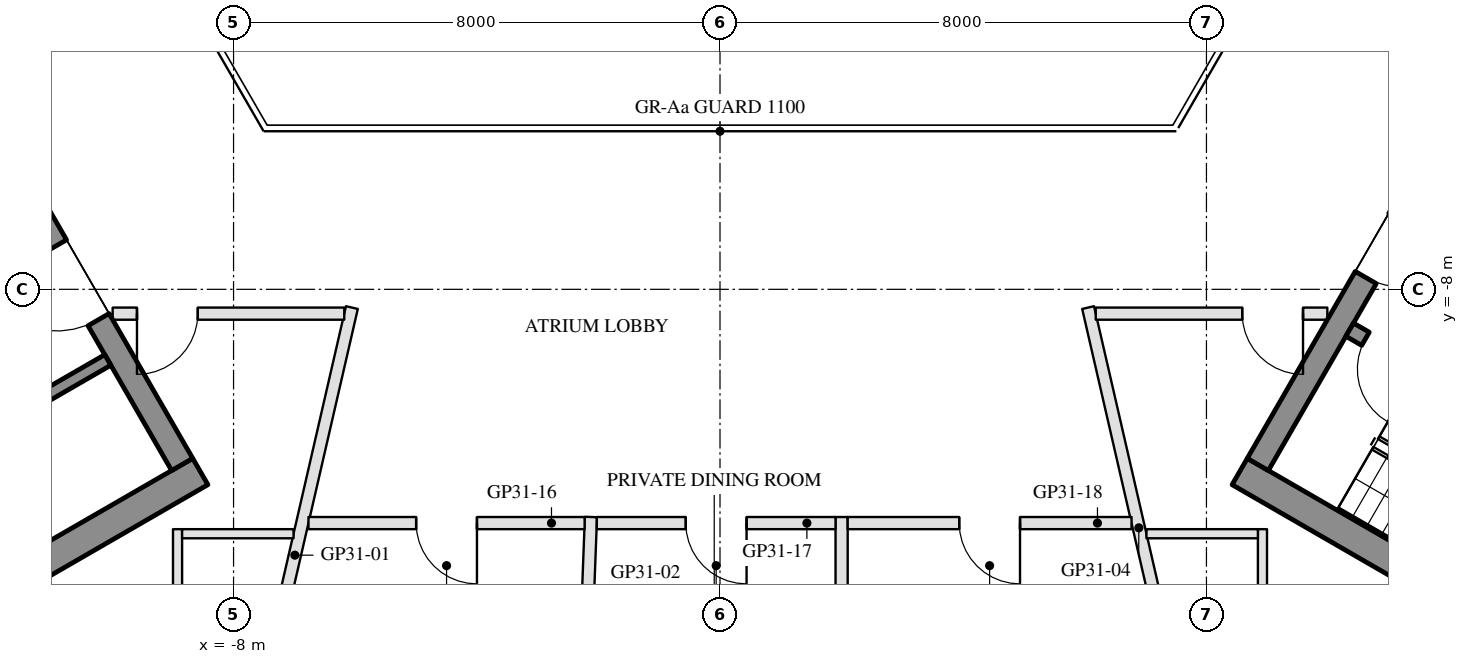
"""IFC4 building model, lengths in metres.
Left out: names, types, materials, properties, quantities, classifications, styles, units other than length and angle.
Written with IfcOpenShell. Run it as: python <this file> out.ifc"""

import sys

from ifc_helpers import new_model, si_unit, direction, frame, frame_2d, origin, place, context, subcontext, project, spatial, rectangle, extrude, element, fill, save


model = new_model("IFC4")
c1 = context("Model", 3, precision=1e-05, world=origin(), true_north=direction((0.0, 1.0)))
c2 = subcontext(c1, "Body", "Model", "MODEL_VIEW")
j1 = project(units=[si_unit("LENGTHUNIT", "METRE"), si_unit("PLANEANGLEUNIT", "RADIAN")], contexts=[c1])
p1 = place(None, origin())
s1 = spatial("IfcSite", under=j1, at=p1, CompositionType="ELEMENT")
p2 = place(p1, origin())
s2 = spatial("IfcBuilding", under=s1, at=p2, CompositionType="ELEMENT")
p3 = place(p2, frame((0.0, 0.0, 305.9)))
s3 = spatial("IfcBuildingStorey", under=s2, at=p3, CompositionType="ELEMENT", Elevation=305.9)
p4 = place(p3, frame((-8.547, -10.997, 0.0), z_axis=(0.0, 0.0, 1.0), x_axis=(-0.866027279078, -0.499996751883, 0.0)))
e1 = element("IfcWall", 1, at=p4, inside=s3, PredefinedType="SHEAR", context=c2, shape_type="SweptSolid", body=[
    extrude(rectangle(XDim=10.298, YDim=0.5, at=frame_2d((5.149, 0.0))), origin(), (0.0, 0.0, 1.0), 3.5),
])
p5 = place(p3, frame((-13.845, -2.22, 0.0), z_axis=(0.0, 0.0, 1.0), x_axis=(0.500004234368, -0.866022959057, 0.0)))
e2 = element("IfcWall", 2, at=p5, inside=s3, PredefinedType="SHEAR", context=c2, shape_type="SweptSolid", body=[
    extrude(rectangle(XDim=10.0, YDim=0.4, at=frame_2d((5.0, 0.0))), origin(), (0.0, 0.0, 1.0), 3.5),
])
p6 = place(p5, frame((3.55, 0.0, 0.0)))
e3 = element("IfcOpeningElement", 3, at=p6, cuts=e2, PredefinedType="OPENING", context=c2, shape_type="SweptSolid", body=[
    extrude(rectangle(XDim=1.1, YDim=2.1, at=frame_2d((0.55, 1.05))), frame((0.0, 0.21, 0.0), z_axis=(0.0, -1.0, 0.0), x_axis=(1.0, 0.0, 0.0)), (0.0, 0.0, 1.0), 0.42),
])
p7 = place(p5, frame((5.85, 0.0, 0.0)))
e4 = element("IfcOpeningElement", 4, at=p7, cuts=e2, PredefinedType="OPENING", context=c2, shape_type="SweptSolid", body=[
    extrude(rectangle(XDim=1.4, YDim=2.1, at=frame_2d((0.7, 1.05))), frame((0.0, 0.21, 0.0), z_axis=(0.0, -1.0, 0.0), x_axis=(1.0, 0.0, 0.0)), (0.0, 0.0, 1.0), 0.42),
])
p8 = place(p3, frame((-10.068, -9.162, 0.0), z_axis=(0.0, 0.0, 1.0), x_axis=(-0.866032725843, -0.499987317609, 0.0)))
e5 = element("IfcWall", 5, at=p8, inside=s3, PredefinedType="SHEAR", context=c2, shape_type="SweptSolid", body=[
    extrude(rectangle(XDim=10.16, YDim=0.2, at=frame_2d((5.08, 0.0))), origin(), (0.0, 0.0, 1.0), 3.5),
])
p9 = place(p8, frame((4.53, 0.0, 0.0)))
e6 = element("IfcOpeningElement", 6, at=p9, cuts=e5, PredefinedType="OPENING", context=c2, shape_type="SweptSolid", body=[
    extrude(rectangle(XDim=0.9, YDim=2.1, at=frame_2d((0.45, 1.05))), frame((0.0, 0.11, 0.0), z_axis=(0.0, -1.0, 0.0), x_axis=(1.0, 0.0, 0.0)), (0.0, 0.0, 1.0), 0.22),
])
p10 = place(p3, frame((8.547, -10.997, 0.0), z_axis=(0.0, 0.0, 1.0), x_axis=(0.866027279078, -0.499996751883, 0.0)))
e7 = element("IfcWall", 7, at=p10, inside=s3, PredefinedType="SHEAR", context=c2, shape_type="SweptSolid", body=[
    extrude(rectangle(XDim=10.298, YDim=0.5, at=frame_2d((5.149, 0.0))), origin(), (0.0, 0.0, 1.0), 3.5),
])
p11 = place(p3, frame((8.845, -10.88, 0.0), z_axis=(0.0, 0.0, 1.0), x_axis=(0.500004234368, 0.866022959057, 0.0)))
e8 = element("IfcWall", 8, at=p11, inside=s3, PredefinedType="SHEAR", context=c2, shape_type="SweptSolid", body=[
    extrude(rectangle(XDim=10.0, YDim=0.4, at=frame_2d((5.0, 0.0))), origin(), (0.0, 0.0, 1.0), 3.5),
])
p12 = place(p11, frame((3.55, 0.0, 0.0)))
e9 = element("IfcOpeningElement", 9, at=p12, cuts=e8, PredefinedType="OPENING", context=c2, shape_type="SweptSolid", body=[
    extrude(rectangle(XDim=1.1, YDim=2.1, at=frame_2d((0.55, 1.05))), frame((0.0, 0.21, 0.0), z_axis=(0.0, -1.0, 0.0), x_axis=(1.0, 0.0, 0.0)), (0.0, 0.0, 1.0), 0.42),
])
p13 = place(p11, frame((5.85, 0.0, 0.0)))
e10 = element("IfcOpeningElement", 10, at=p13, cuts=e8, PredefinedType="OPENING", context=c2, shape_type="SweptSolid", body=[
    extrude(rectangle(XDim=1.4, YDim=2.1, at=frame_2d((0.7, 1.05))), frame((0.0, 0.21, 0.0), z_axis=(0.0, -1.0, 0.0), x_axis=(1.0, 0.0, 0.0)), (0.0, 0.0, 1.0), 0.42),
])
p14 = place(p3, frame((10.356, -8.664, 0.0), z_axis=(0.0, 0.0, 1.0), x_axis=(0.866028629588, -0.499994412703, 0.0)))
e11 = element("IfcWall", 11, at=p14, inside=s3, PredefinedType="SHEAR", context=c2, shape_type="SweptSolid", body=[
    extrude(rectangle(XDim=6.45, YDim=0.25, at=frame_2d((3.225, 0.0))), origin(), (0.0, 0.0, 1.0), 3.5),
])
p15 = place(p14, frame((0.3, 0.0, 0.0)))
e12 = element("IfcOpeningElement", 12, at=p15, cuts=e11, PredefinedType="OPENING", context=c2, shape_type="SweptSolid", body=[
    extrude(rectangle(XDim=1.0, YDim=2.1, at=frame_2d((0.5, 1.05))), frame((0.0, 0.135, 0.0), z_axis=(0.0, -1.0, 0.0), x_axis=(1.0, 0.0, 0.0)), (0.0, 0.0, 1.0), 0.27),
])
p16 = place(p3, frame((-7.93, -16.445, 0.0), z_axis=(0.0, 0.0, 1.0), x_axis=(0.224458408835, 0.974483669798, 0.0)))
e13 = element("IfcWall", 13, at=p16, inside=s3, PredefinedType="PARTITIONING", context=c2, shape_type="SweptSolid", body=[
    extrude(rectangle(XDim=8.358, YDim=0.2, at=frame_2d((4.179, 0.0))), origin(), (0.0, 0.0, 1.0), 3.1),
])
p17 = place(p3, frame((-2.266, -15.545, 0.0), z_axis=(0.0, 0.0, 1.0), x_axis=(0.037750136795, 0.999287209551, 0.0)))
e14 = element("IfcWall", 14, at=p17, inside=s3, PredefinedType="PARTITIONING", context=c2, shape_type="SweptSolid", body=[
    extrude(rectangle(XDim=3.803, YDim=0.2, at=frame_2d((1.901, 0.0))), origin(), (0.0, 0.0, 1.0), 3.1),
])
p18 = place(p3, frame((2.0, -16.445, 0.0), z_axis=(0.0, 0.0, 1.0), x_axis=(0.0, 1.0, 0.0)))
e15 = element("IfcWall", 15, at=p18, inside=s3, PredefinedType="PARTITIONING", context=c2, shape_type="SweptSolid", body=[
    extrude(rectangle(XDim=4.7, YDim=0.2, at=frame_2d((2.35, 0.0))), origin(), (0.0, 0.0, 1.0), 3.1),
])
p19 = place(p3, frame((7.723, -15.545, 0.0), z_axis=(0.0, 0.0, 1.0), x_axis=(-0.224458954761, 0.974483544052, 0.0)))
e16 = element("IfcWall", 16, at=p19, inside=s3, PredefinedType="PARTITIONING", context=c2, shape_type="SweptSolid", body=[
    extrude(rectangle(XDim=7.434, YDim=0.2, at=frame_2d((3.717, 0.0))), origin(), (0.0, 0.0, 1.0), 3.1),
])
p20 = place(p3, frame((-6.18, -8.4, 0.0), z_axis=(0.0, 0.0, 1.0), x_axis=(-1.0, 0.0, 0.0)))
e17 = element("IfcWall", 17, at=p20, inside=s3, PredefinedType="PARTITIONING", context=c2, shape_type="SweptSolid", body=[
    extrude(rectangle(XDim=3.809, YDim=0.2, at=frame_2d((1.904, 0.0))), origin(), (0.0, 0.0, 1.0), 3.1),
])
p21 = place(p20, frame((2.409, 0.0, 0.0)))
e18 = element("IfcOpeningElement", 18, at=p21, cuts=e17, PredefinedType="OPENING", context=c2, shape_type="SweptSolid", body=[
    extrude(rectangle(XDim=1.0, YDim=2.1, at=frame_2d((0.5, 1.05))), frame((0.0, 0.11, 0.0), z_axis=(0.0, -1.0, 0.0), x_axis=(1.0, 0.0, 0.0)), (0.0, 0.0, 1.0), 0.22),
])
p22 = place(p3, frame((-8.921, -11.945, 0.0), z_axis=(0.0, 0.0, 1.0), x_axis=(0.0, -1.0, 0.0)))
e19 = element("IfcWall", 19, at=p22, inside=s3, PredefinedType="PARTITIONING", context=c2, shape_type="SweptSolid", body=[
    extrude(rectangle(XDim=2.8, YDim=0.15, at=frame_2d((1.4, 0.0))), origin(), (0.0, 0.0, 1.0), 3.1),
])
p23 = place(p22, frame((1.4, 0.0, 0.0)))
e20 = element("IfcOpeningElement", 20, at=p23, cuts=e19, PredefinedType="OPENING", context=c2, shape_type="SweptSolid", body=[
    extrude(rectangle(XDim=0.9, YDim=2.1, at=frame_2d((0.45, 1.05))), frame((0.0, 0.085, 0.0), z_axis=(0.0, -1.0, 0.0), x_axis=(1.0, 0.0, 0.0)), (0.0, 0.0, 1.0), 0.17),
])
p24 = place(p3, frame((-8.846, -12.02, 0.0), z_axis=(0.0, 0.0, 1.0), x_axis=(1.0, 0.0, 0.0)))
e21 = element("IfcWall", 21, at=p24, inside=s3, PredefinedType="PARTITIONING", context=c2, shape_type="SweptSolid", body=[
    extrude(rectangle(XDim=1.833, YDim=0.15, at=frame_2d((0.917, 0.0))), origin(), (0.0, 0.0, 1.0), 3.55),
])
p25 = place(p3, frame((-2.226, -11.844, 0.0), z_axis=(0.0, 0.0, 1.0), x_axis=(-1.0, 0.0, 0.0)))
e22 = element("IfcWall", 22, at=p25, inside=s3, PredefinedType="PARTITIONING", context=c2, shape_type="SweptSolid", body=[
    extrude(rectangle(XDim=4.542, YDim=0.2, at=frame_2d((2.271, 0.0))), origin(), (0.0, 0.0, 1.0), 3.1),
])
p26 = place(p25, frame((1.771, 0.0, 0.0)))
e23 = element("IfcOpeningElement", 23, at=p26, cuts=e22, PredefinedType="OPENING", context=c2, shape_type="SweptSolid", body=[
    extrude(rectangle(XDim=1.0, YDim=2.1, at=frame_2d((0.5, 1.05))), frame((0.0, 0.11, 0.0), z_axis=(0.0, -1.0, 0.0), x_axis=(1.0, 0.0, 0.0)), (0.0, 0.0, 1.0), 0.22),
])
p27 = place(p3, frame((1.9, -11.844, 0.0), z_axis=(0.0, 0.0, 1.0), x_axis=(-1.0, 0.0, 0.0)))
e24 = element("IfcWall", 24, at=p27, inside=s3, PredefinedType="PARTITIONING", context=c2, shape_type="SweptSolid", body=[
    extrude(rectangle(XDim=3.926, YDim=0.2, at=frame_2d((1.963, 0.0))), origin(), (0.0, 0.0, 1.0), 3.1),
])
p28 = place(p27, frame((1.463, 0.0, 0.0)))
e25 = element("IfcOpeningElement", 25, at=p28, cuts=e24, PredefinedType="OPENING", context=c2, shape_type="SweptSolid", body=[
    extrude(rectangle(XDim=1.0, YDim=2.1, at=frame_2d((0.5, 1.05))), frame((0.0, 0.11, 0.0), z_axis=(0.0, -1.0, 0.0), x_axis=(1.0, 0.0, 0.0)), (0.0, 0.0, 1.0), 0.22),
])
p29 = place(p3, frame((6.768, -11.844, 0.0), z_axis=(0.0, 0.0, 1.0), x_axis=(-1.0, 0.0, 0.0)))
e26 = element("IfcWall", 26, at=p29, inside=s3, PredefinedType="PARTITIONING", context=c2, shape_type="SweptSolid", body=[
    extrude(rectangle(XDim=4.668, YDim=0.2, at=frame_2d((2.334, 0.0))), origin(), (0.0, 0.0, 1.0), 3.1),
])
p30 = place(p29, frame((1.834, 0.0, 0.0)))
e27 = element("IfcOpeningElement", 27, at=p30, cuts=e26, PredefinedType="OPENING", context=c2, shape_type="SweptSolid", body=[
    extrude(rectangle(XDim=1.0, YDim=2.1, at=frame_2d((0.5, 1.05))), frame((0.0, 0.11, 0.0), z_axis=(0.0, -1.0, 0.0), x_axis=(1.0, 0.0, 0.0)), (0.0, 0.0, 1.0), 0.22),
])
p31 = place(p3, frame((9.988, -8.4, 0.0), z_axis=(0.0, 0.0, 1.0), x_axis=(-1.0, 0.0, 0.0)))
e28 = element("IfcWall", 28, at=p31, inside=s3, PredefinedType="PARTITIONING", context=c2, shape_type="SweptSolid", body=[
    extrude(rectangle(XDim=3.809, YDim=0.2, at=frame_2d((1.904, 0.0))), origin(), (0.0, 0.0, 1.0), 3.1),
])
p32 = place(p31, frame((0.4, 0.0, 0.0)))
e29 = element("IfcOpeningElement", 29, at=p32, cuts=e28, PredefinedType="OPENING", context=c2, shape_type="SweptSolid", body=[
    extrude(rectangle(XDim=1.0, YDim=2.1, at=frame_2d((0.5, 1.05))), frame((0.0, 0.11, 0.0), z_axis=(0.0, -1.0, 0.0), x_axis=(1.0, 0.0, 0.0)), (0.0, 0.0, 1.0), 0.22),
])
p33 = place(p3, frame((8.921, -14.745, 0.0), z_axis=(0.0, 0.0, 1.0), x_axis=(0.0, 1.0, 0.0)))
e30 = element("IfcWall", 30, at=p33, inside=s3, PredefinedType="PARTITIONING", context=c2, shape_type="SweptSolid", body=[
    extrude(rectangle(XDim=2.8, YDim=0.15, at=frame_2d((1.4, 0.0))), origin(), (0.0, 0.0, 1.0), 3.1),
])
p34 = place(p33, frame((0.5, 0.0, 0.0)))
e31 = element("IfcOpeningElement", 31, at=p34, cuts=e30, PredefinedType="OPENING", context=c2, shape_type="SweptSolid", body=[
    extrude(rectangle(XDim=0.9, YDim=2.1, at=frame_2d((0.45, 1.05))), frame((0.0, 0.085, 0.0), z_axis=(0.0, -1.0, 0.0), x_axis=(1.0, 0.0, 0.0)), (0.0, 0.0, 1.0), 0.17),
])
p35 = place(p3, frame((7.013, -12.02, 0.0), z_axis=(0.0, 0.0, 1.0), x_axis=(1.0, 0.0, 0.0)))
e32 = element("IfcWall", 32, at=p35, inside=s3, PredefinedType="PARTITIONING", context=c2, shape_type="SweptSolid", body=[
    extrude(rectangle(XDim=1.833, YDim=0.15, at=frame_2d((0.917, 0.0))), origin(), (0.0, 0.0, 1.0), 3.55),
])
p36 = place(p3, frame((10.365, -1.152, 0.0), z_axis=(0.0, 0.0, 1.0), x_axis=(0.499999897272, -0.866025463095, 0.0)))
e33 = element("IfcWall", 33, at=p36, inside=s3, PredefinedType="PARTITIONING", context=c2, shape_type="SweptSolid", body=[
    extrude(rectangle(XDim=3.809, YDim=0.2, at=frame_2d((1.904, 0.0))), origin(), (0.0, 0.0, 1.0), 3.1),
])
p37 = place(p36, frame((2.409, 0.0, 0.0)))
e34 = element("IfcOpeningElement", 34, at=p37, cuts=e33, PredefinedType="OPENING", context=c2, shape_type="SweptSolid", body=[
    extrude(rectangle(XDim=1.0, YDim=2.1, at=frame_2d((0.5, 1.05))), frame((0.0, 0.11, 0.0), z_axis=(0.0, -1.0, 0.0), x_axis=(1.0, 0.0, 0.0)), (0.0, 0.0, 1.0), 0.22),
])
p38 = place(p3, frame((-12.269, -4.45, 0.0), z_axis=(0.0, 0.0, 1.0), x_axis=(0.50002670742, 0.866009983699, 0.0)))
e35 = element("IfcWall", 35, at=p38, inside=s3, PredefinedType="PARTITIONING", context=c2, shape_type="SweptSolid", body=[
    extrude(rectangle(XDim=5.788, YDim=0.2, at=frame_2d((2.894, 0.0))), origin(), (0.0, 0.0, 1.0), 3.1),
])
p39 = place(p38, frame((2.338, 0.0, 0.0)))
e36 = element("IfcOpeningElement", 36, at=p39, cuts=e35, PredefinedType="OPENING", context=c2, shape_type="SweptSolid", body=[
    extrude(rectangle(XDim=1.0, YDim=2.1, at=frame_2d((0.5, 1.05))), frame((0.0, 0.11, 0.0), z_axis=(0.0, -1.0, 0.0), x_axis=(1.0, 0.0, 0.0)), (0.0, 0.0, 1.0), 0.22),
])
p40 = place(p7, frame((1.4, 0.0, 0.0), z_axis=(0.0, 0.0, 1.0), x_axis=(-1.0, 0.0, 0.0)))
e37 = element("IfcDoor", 37, at=p40, inside=s3, OperationType="DOUBLE_DOOR_SINGLE_SWING", PredefinedType="DOOR", context=c2, shape_type="SweptSolid", body=[
    extrude(rectangle(XDim=1.4, YDim=2.1, at=frame_2d((0.7, 1.05))), frame((0.0, 0.025, 0.0), z_axis=(0.0, -1.0, 0.0), x_axis=(1.0, 0.0, 0.0)), (0.0, 0.0, 1.0), 0.05),
])
fill(e4, e37)
p41 = place(p12, frame((1.1, 0.0, 0.0), z_axis=(0.0, 0.0, 1.0), x_axis=(-1.0, 0.0, 0.0)))
e38 = element("IfcDoor", 38, at=p41, inside=s3, OperationType="SINGLE_SWING_LEFT", PredefinedType="DOOR", context=c2, shape_type="SweptSolid", body=[
    extrude(rectangle(XDim=1.1, YDim=2.1, at=frame_2d((0.55, 1.05))), frame((0.0, 0.025, 0.0), z_axis=(0.0, -1.0, 0.0), x_axis=(1.0, 0.0, 0.0)), (0.0, 0.0, 1.0), 0.05),
])
fill(e9, e38)
p42 = place(p15, frame((1.0, 0.0, 0.0), z_axis=(0.0, 0.0, 1.0), x_axis=(-1.0, 0.0, 0.0)))
e39 = element("IfcDoor", 39, at=p42, inside=s3, OperationType="SINGLE_SWING_LEFT", PredefinedType="DOOR", context=c2, shape_type="SweptSolid", body=[
    extrude(rectangle(XDim=1.0, YDim=2.1, at=frame_2d((0.5, 1.05))), frame((0.0, 0.025, 0.0), z_axis=(0.0, -1.0, 0.0), x_axis=(1.0, 0.0, 0.0)), (0.0, 0.0, 1.0), 0.05),
])
fill(e12, e39)
p43 = place(p21, origin())
e40 = element("IfcDoor", 40, at=p43, inside=s3, OperationType="SINGLE_SWING_RIGHT", PredefinedType="DOOR", context=c2, shape_type="SweptSolid", body=[
    extrude(rectangle(XDim=1.0, YDim=2.1, at=frame_2d((0.5, 1.05))), frame((0.0, 0.025, 0.0), z_axis=(0.0, -1.0, 0.0), x_axis=(1.0, 0.0, 0.0)), (0.0, 0.0, 1.0), 0.05),
])
fill(e18, e40)
p44 = place(p26, origin())
e41 = element("IfcDoor", 41, at=p44, inside=s3, OperationType="SINGLE_SWING_LEFT", PredefinedType="DOOR", context=c2, shape_type="SweptSolid", body=[
    extrude(rectangle(XDim=1.0, YDim=2.1, at=frame_2d((0.5, 1.05))), frame((0.0, 0.025, 0.0), z_axis=(0.0, -1.0, 0.0), x_axis=(1.0, 0.0, 0.0)), (0.0, 0.0, 1.0), 0.05),
])
fill(e23, e41)
p45 = place(p28, origin())
e42 = element("IfcDoor", 42, at=p45, inside=s3, OperationType="SINGLE_SWING_LEFT", PredefinedType="DOOR", context=c2, shape_type="SweptSolid", body=[
    extrude(rectangle(XDim=1.0, YDim=2.1, at=frame_2d((0.5, 1.05))), frame((0.0, 0.025, 0.0), z_axis=(0.0, -1.0, 0.0), x_axis=(1.0, 0.0, 0.0)), (0.0, 0.0, 1.0), 0.05),
])
fill(e25, e42)
p46 = place(p30, origin())
e43 = element("IfcDoor", 43, at=p46, inside=s3, OperationType="SINGLE_SWING_LEFT", PredefinedType="DOOR", context=c2, shape_type="SweptSolid", body=[
    extrude(rectangle(XDim=1.0, YDim=2.1, at=frame_2d((0.5, 1.05))), frame((0.0, 0.025, 0.0), z_axis=(0.0, -1.0, 0.0), x_axis=(1.0, 0.0, 0.0)), (0.0, 0.0, 1.0), 0.05),
])
fill(e27, e43)
p47 = place(p32, origin())
e44 = element("IfcDoor", 44, at=p47, inside=s3, OperationType="SINGLE_SWING_LEFT", PredefinedType="DOOR", context=c2, shape_type="SweptSolid", body=[
    extrude(rectangle(XDim=1.0, YDim=2.1, at=frame_2d((0.5, 1.05))), frame((0.0, 0.025, 0.0), z_axis=(0.0, -1.0, 0.0), x_axis=(1.0, 0.0, 0.0)), (0.0, 0.0, 1.0), 0.05),
])
fill(e29, e44)
save(model, sys.argv[1])
